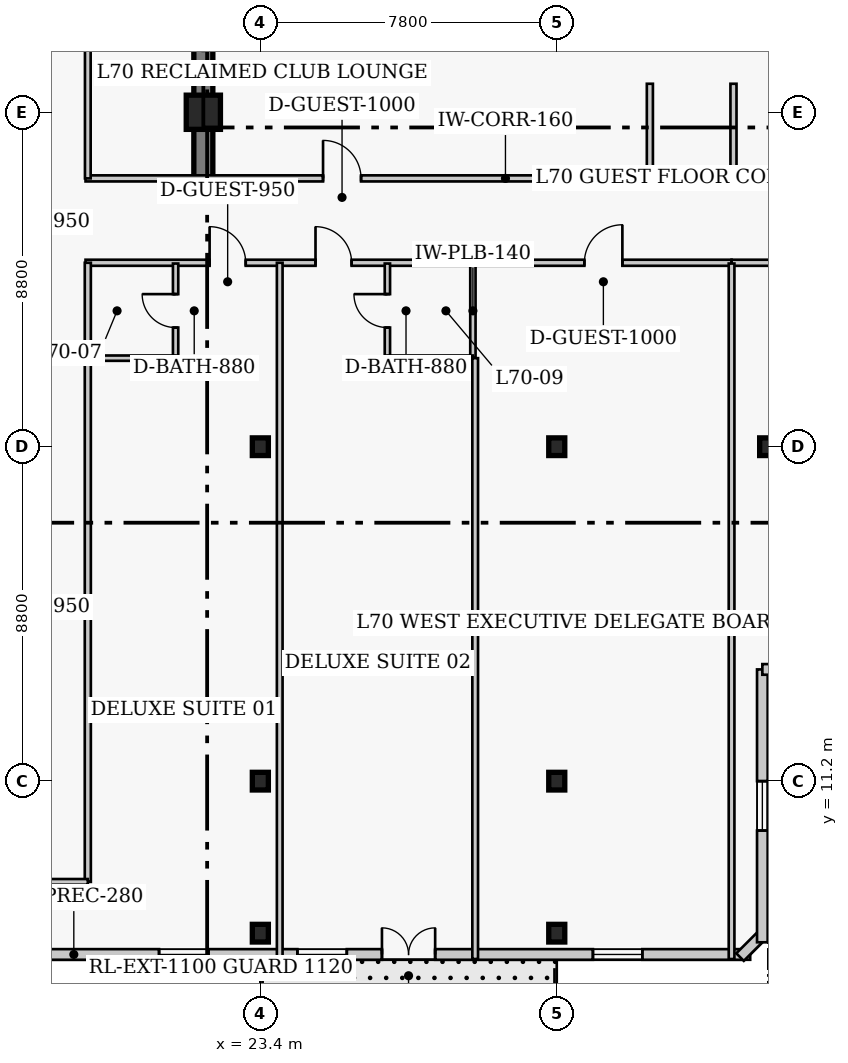
"""IFC4 building model, lengths in metres.
Left out: names, types, materials, properties, quantities, classifications, styles, units other than length and angle.
Written with IfcOpenShell. Run it as: python <this file> out.ifc"""

import sys

from ifc_helpers import new_model, si_unit, direction, frame, frame_2d, origin, origin_2d, place, context, subcontext, project, spatial, rectangle, i_section, extrude, element, fill, save


model = new_model("IFC4")
c1 = context("Model", 3, precision=1e-05, world=origin(), true_north=direction((0.0, 1.0)))
c2 = subcontext(c1, "Body", "Model", "MODEL_VIEW")
j1 = project(units=[si_unit("LENGTHUNIT", "METRE"), si_unit("PLANEANGLEUNIT", "RADIAN")], contexts=[c1])
p1 = place(None, origin())
s1 = spatial("IfcSite", under=j1, at=p1, CompositionType="ELEMENT")
p2 = place(p1, origin())
s2 = spatial("IfcBuilding", under=s1, at=p2, CompositionType="ELEMENT")
p3 = place(p2, frame((0.0, 0.0, 281.4)))
s3 = spatial("IfcBuildingStorey", under=s2, at=p3, CompositionType="ELEMENT", Elevation=281.4)
p4 = place(p3, frame((21.9, 27.05, 0.0), z_axis=(0.0, 0.0, 1.0), x_axis=(0.0, 1.0, 0.0)))
e1 = element("IfcWall", 1, at=p4, inside=s3, PredefinedType="SHEAR", context=c2, shape_type="SweptSolid", body=[
    extrude(rectangle(XDim=13.52, YDim=0.5, at=frame_2d((6.76, 0.0))), origin(), (0.0, 0.0, 1.0), 4.0),
])
for number, where, z_axis, x_axis in (
    (2, (23.4, 11.2, 0.0), (0.0, 0.0, 1.0), (1.0, 0.0, 0.0)),
    (3, (23.4, 20.0, 0.0), (0.0, 0.0, 1.0), (1.0, 0.0, 0.0)),
    (4, (31.2, 11.2, 0.0), (0.0, 0.0, 1.0), (1.0, 0.0, 0.0)),
    (5, (31.2, 20.0, 0.0), (0.0, 0.0, 1.0), (1.0, 0.0, 0.0)),
    (6, (36.75, 20.0, 0.0), (0.0, 0.0, 1.0), (1.0, 0.0, 0.0)),
):
    element("IfcColumn", number, at=place(p3, frame(where, z_axis=z_axis, x_axis=x_axis)), inside=s3, PredefinedType="COLUMN", context=c2, shape_type="SweptSolid", body=[
        extrude(i_section(OverallWidth=0.422, OverallDepth=0.465, WebThickness=0.045, FlangeThickness=0.073, FilletRadius=0.017, at=origin_2d()), origin(), (0.0, 0.0, 1.0), 4.0),
    ])
p5 = place(p3, frame((21.9, 28.8, 0.0), z_axis=(0.0, 0.0, 1.0), x_axis=(1.0, 0.0, 0.0)))
e7 = element("IfcColumn", 7, at=p5, inside=s3, PredefinedType="COLUMN", context=c2, shape_type="SweptSolid", body=[
    extrude(rectangle(XDim=0.9, YDim=0.9, at=origin_2d()), origin(), (0.0, 0.0, 1.0), 4.0),
])
for number, where, z_axis, x_axis in (
    (8, (23.4, 7.2, 0.0), (0.0, 0.0, 1.0), (1.0, 0.0, 0.0)),
    (9, (31.2, 7.2, 0.0), (0.0, 0.0, 1.0), (1.0, 0.0, 0.0)),
):
    element("IfcColumn", number, at=place(p3, frame(where, z_axis=z_axis, x_axis=x_axis)), inside=s3, PredefinedType="COLUMN", context=c2, shape_type="SweptSolid", body=[
        extrude(i_section(OverallWidth=0.422, OverallDepth=0.465, WebThickness=0.045, FlangeThickness=0.073, FilletRadius=0.017, at=origin_2d()), origin(), (0.0, 0.0, 1.0), 4.0),
    ])
p6 = place(p3, frame((11.46, 6.64, 0.0), z_axis=(0.0, 0.0, 1.0), x_axis=(1.0, 0.0, 0.0)))
e10 = element("IfcWall", 10, at=p6, inside=s3, PredefinedType="SOLIDWALL", context=c2, shape_type="SweptSolid", body=[
    extrude(rectangle(XDim=24.83, YDim=0.28, at=frame_2d((12.415, 0.0))), origin(), (0.0, 0.0, 1.0), 3.76),
])
p7 = place(p6, frame((15.14, 0.0, 0.0)))
e11 = element("IfcOpeningElement", 11, at=p7, cuts=e10, PredefinedType="OPENING", context=c2, shape_type="SweptSolid", body=[
    extrude(rectangle(XDim=1.4, YDim=2.15, at=frame_2d((0.7, 1.075))), frame((0.0, 0.15, 0.0), z_axis=(0.0, -1.0, 0.0), x_axis=(1.0, 0.0, 0.0)), (0.0, 0.0, 1.0), 0.3),
])
p8 = place(p6, frame((3.488, 0.0, 0.85)))
e12 = element("IfcOpeningElement", 12, at=p8, cuts=e10, PredefinedType="OPENING", context=c2, shape_type="SweptSolid", body=[
    extrude(rectangle(XDim=1.3, YDim=1.7, at=frame_2d((0.65, 0.85))), frame((0.0, 0.15, 0.0), z_axis=(0.0, -1.0, 0.0), x_axis=(1.0, 0.0, 0.0)), (0.0, 0.0, 1.0), 0.3),
])
p9 = place(p6, frame((12.915, 0.0, 0.85)))
e13 = element("IfcOpeningElement", 13, at=p9, cuts=e10, PredefinedType="OPENING", context=c2, shape_type="SweptSolid", body=[
    extrude(rectangle(XDim=1.3, YDim=1.7, at=frame_2d((0.65, 0.85))), frame((0.0, 0.15, 0.0), z_axis=(0.0, -1.0, 0.0), x_axis=(1.0, 0.0, 0.0)), (0.0, 0.0, 1.0), 0.3),
])
p10 = place(p6, frame((20.692, 0.0, 0.85)))
e14 = element("IfcOpeningElement", 14, at=p10, cuts=e10, PredefinedType="OPENING", context=c2, shape_type="SweptSolid", body=[
    extrude(rectangle(XDim=1.3, YDim=1.7, at=frame_2d((0.65, 0.85))), frame((0.0, 0.15, 0.0), z_axis=(0.0, -1.0, 0.0), x_axis=(1.0, 0.0, 0.0)), (0.0, 0.0, 1.0), 0.3),
])
p11 = place(p6, frame((9.275, 0.0, 0.85)))
e15 = element("IfcOpeningElement", 15, at=p11, cuts=e10, PredefinedType="OPENING", context=c2, shape_type="SweptSolid", body=[
    extrude(rectangle(XDim=1.3, YDim=1.7, at=frame_2d((0.65, 0.85))), frame((0.0, 0.15, 0.0), z_axis=(0.0, -1.0, 0.0), x_axis=(1.0, 0.0, 0.0)), (0.0, 0.0, 1.0), 0.3),
])
p12 = place(p3, frame((36.023, 6.571, 0.0), z_axis=(0.0, 0.0, 1.0), x_axis=(0.707106781187, 0.707106781187, 0.0)))
e16 = element("IfcWall", 16, at=p12, inside=s3, PredefinedType="SOLIDWALL", context=c2, shape_type="SweptSolid", body=[
    extrude(rectangle(XDim=0.928, YDim=0.28, at=frame_2d((0.464, 0.0))), origin(), (0.0, 0.0, 1.0), 3.76),
])
p13 = place(p3, frame((36.61, 6.96, 0.0), z_axis=(0.0, 0.0, 1.0), x_axis=(0.0, 1.0, 0.0)))
e17 = element("IfcWall", 17, at=p13, inside=s3, PredefinedType="SOLIDWALL", context=c2, shape_type="SweptSolid", body=[
    extrude(rectangle(XDim=7.18, YDim=0.28, at=frame_2d((3.59, 0.0))), origin(), (0.0, 0.0, 1.0), 3.76),
])
p14 = place(p13, frame((2.94, 0.0, 0.85)))
e18 = element("IfcOpeningElement", 18, at=p14, cuts=e17, PredefinedType="OPENING", context=c2, shape_type="SweptSolid", body=[
    extrude(rectangle(XDim=1.3, YDim=1.7, at=frame_2d((0.65, 0.85))), frame((0.0, 0.15, 0.0), z_axis=(0.0, -1.0, 0.0), x_axis=(1.0, 0.0, 0.0)), (0.0, 0.0, 1.0), 0.3),
])
p15 = place(p3, frame((36.61, 14.14, 0.0), z_axis=(0.0, 0.0, 1.0), x_axis=(1.0, 0.0, 0.0)))
e19 = element("IfcWall", 19, at=p15, inside=s3, PredefinedType="SOLIDWALL", context=c2, shape_type="SweptSolid", body=[
    extrude(rectangle(XDim=4.78, YDim=0.28, at=frame_2d((2.39, 0.0))), origin(), (0.0, 0.0, 1.0), 3.76),
])
p16 = place(p15, frame((1.74, 0.0, 0.85)))
e20 = element("IfcOpeningElement", 20, at=p16, cuts=e19, PredefinedType="OPENING", context=c2, shape_type="SweptSolid", body=[
    extrude(rectangle(XDim=1.3, YDim=1.7, at=frame_2d((0.65, 0.85))), frame((0.0, 0.15, 0.0), z_axis=(0.0, -1.0, 0.0), x_axis=(1.0, 0.0, 0.0)), (0.0, 0.0, 1.0), 0.3),
])
p17 = place(p3, frame((18.8, 27.06, 0.0), z_axis=(0.0, 0.0, 1.0), x_axis=(1.0, 0.0, 0.0)))
e21 = element("IfcWall", 21, at=p17, inside=s3, PredefinedType="PARTITIONING", context=c2, shape_type="SweptSolid", body=[
    extrude(rectangle(XDim=14.85, YDim=0.16, at=frame_2d((7.425, 0.0))), origin(), (0.0, 0.0, 1.0), 3.76),
])
p18 = place(p17, frame((6.25, 0.0, 0.0)))
e22 = element("IfcOpeningElement", 22, at=p18, cuts=e21, PredefinedType="OPENING", context=c2, shape_type="SweptSolid", body=[
    extrude(rectangle(XDim=1.0, YDim=2.15, at=frame_2d((0.5, 1.075))), frame((0.0, 0.09, 0.0), z_axis=(0.0, -1.0, 0.0), x_axis=(1.0, 0.0, 0.0)), (0.0, 0.0, 1.0), 0.18),
])
p19 = place(p3, frame((35.85, 27.06, 0.0), z_axis=(0.0, 0.0, 1.0), x_axis=(1.0, 0.0, 0.0)))
e23 = element("IfcWall", 23, at=p19, inside=s3, PredefinedType="PARTITIONING", context=c2, shape_type="SweptSolid", body=[
    extrude(rectangle(XDim=23.35, YDim=0.16, at=frame_2d((11.675, 0.0))), origin(), (0.0, 0.0, 1.0), 3.76),
])
p20 = place(p19, frame((6.15, 0.0, 0.0)))
e24 = element("IfcOpeningElement", 24, at=p20, cuts=e23, PredefinedType="OPENING", context=c2, shape_type="SweptSolid", body=[
    extrude(rectangle(XDim=1.0, YDim=2.15, at=frame_2d((0.5, 1.075))), frame((0.0, 0.09, 0.0), z_axis=(0.0, -1.0, 0.0), x_axis=(1.0, 0.0, 0.0)), (0.0, 0.0, 1.0), 0.18),
])
p21 = place(p19, frame((13.65, 0.0, 0.0)))
e25 = element("IfcOpeningElement", 25, at=p21, cuts=e23, PredefinedType="OPENING", context=c2, shape_type="SweptSolid", body=[
    extrude(rectangle(XDim=1.0, YDim=2.15, at=frame_2d((0.5, 1.075))), frame((0.0, 0.09, 0.0), z_axis=(0.0, -1.0, 0.0), x_axis=(1.0, 0.0, 0.0)), (0.0, 0.0, 1.0), 0.18),
])
for number, where, z_axis, x_axis in (
    (26, (33.65, 27.06, 0.0), (0.0, 0.0, 1.0), (0.0, 1.0, 0.0)),
    (27, (35.85, 27.06, 0.0), (0.0, 0.0, 1.0), (0.0, 1.0, 0.0)),
):
    element("IfcWall", number, at=place(p3, frame(where, z_axis=z_axis, x_axis=x_axis)), inside=s3, PredefinedType="PARTITIONING", context=c2, shape_type="SweptSolid", body=[
        extrude(rectangle(XDim=2.49, YDim=0.16, at=frame_2d((1.245, 0.0))), origin(), (0.0, 0.0, 1.0), 3.76),
    ])
p22 = place(p3, frame((18.8, 24.84, 0.0), z_axis=(0.0, 0.0, 1.0), x_axis=(1.0, 0.0, 0.0)))
e28 = element("IfcWall", 28, at=p22, inside=s3, PredefinedType="PARTITIONING", context=c2, shape_type="SweptSolid", body=[
    extrude(rectangle(XDim=17.0, YDim=0.16, at=frame_2d((8.5, 0.0))), origin(), (0.0, 0.0, 1.0), 3.76),
])
p23 = place(p22, frame((3.265, 0.0, 0.0)))
e29 = element("IfcOpeningElement", 29, at=p23, cuts=e28, PredefinedType="OPENING", context=c2, shape_type="SweptSolid", body=[
    extrude(rectangle(XDim=0.95, YDim=2.1, at=frame_2d((0.475, 1.05))), frame((0.0, 0.09, 0.0), z_axis=(0.0, -1.0, 0.0), x_axis=(1.0, 0.0, 0.0)), (0.0, 0.0, 1.0), 0.18),
])
p24 = place(p22, frame((6.052, 0.0, 0.0)))
e30 = element("IfcOpeningElement", 30, at=p24, cuts=e28, PredefinedType="OPENING", context=c2, shape_type="SweptSolid", body=[
    extrude(rectangle(XDim=0.95, YDim=2.1, at=frame_2d((0.475, 1.05))), frame((0.0, 0.09, 0.0), z_axis=(0.0, -1.0, 0.0), x_axis=(1.0, 0.0, 0.0)), (0.0, 0.0, 1.0), 0.18),
])
p25 = place(p22, frame((13.127, 0.0, 0.0)))
e31 = element("IfcOpeningElement", 31, at=p25, cuts=e28, PredefinedType="OPENING", context=c2, shape_type="SweptSolid", body=[
    extrude(rectangle(XDim=1.0, YDim=2.15, at=frame_2d((0.5, 1.075))), frame((0.0, 0.09, 0.0), z_axis=(0.0, -1.0, 0.0), x_axis=(1.0, 0.0, 0.0)), (0.0, 0.0, 1.0), 0.18),
])
p26 = place(p3, frame((35.8, 24.84, 0.0), z_axis=(0.0, 0.0, 1.0), x_axis=(1.0, 0.0, 0.0)))
e32 = element("IfcWall", 32, at=p26, inside=s3, PredefinedType="PARTITIONING", context=c2, shape_type="SweptSolid", body=[
    extrude(rectangle(XDim=25.56, YDim=0.16, at=frame_2d((12.78, 0.0))), origin(), (0.0, 0.0, 1.0), 3.76),
])
p27 = place(p26, frame((4.185, 0.0, 0.0)))
e33 = element("IfcOpeningElement", 33, at=p27, cuts=e32, PredefinedType="OPENING", context=c2, shape_type="SweptSolid", body=[
    extrude(rectangle(XDim=0.95, YDim=2.1, at=frame_2d((0.475, 1.05))), frame((0.0, 0.09, 0.0), z_axis=(0.0, -1.0, 0.0), x_axis=(1.0, 0.0, 0.0)), (0.0, 0.0, 1.0), 0.18),
])
p28 = place(p26, frame((17.28, 0.0, 0.0)))
e34 = element("IfcOpeningElement", 34, at=p28, cuts=e32, PredefinedType="OPENING", context=c2, shape_type="SweptSolid", body=[
    extrude(rectangle(XDim=1.0, YDim=2.15, at=frame_2d((0.5, 1.075))), frame((0.0, 0.09, 0.0), z_axis=(0.0, -1.0, 0.0), x_axis=(1.0, 0.0, 0.0)), (0.0, 0.0, 1.0), 0.18),
])
p29 = place(p26, frame((24.015, 0.0, 0.0)))
e35 = element("IfcOpeningElement", 35, at=p29, cuts=e32, PredefinedType="OPENING", context=c2, shape_type="SweptSolid", body=[
    extrude(rectangle(XDim=0.95, YDim=2.1, at=frame_2d((0.475, 1.05))), frame((0.0, 0.09, 0.0), z_axis=(0.0, -1.0, 0.0), x_axis=(1.0, 0.0, 0.0)), (0.0, 0.0, 1.0), 0.18),
])
p30 = place(p3, frame((18.86, 8.55, 0.0), z_axis=(0.0, 0.0, 1.0), x_axis=(0.0, 1.0, 0.0)))
e36 = element("IfcWall", 36, at=p30, inside=s3, PredefinedType="PARTITIONING", context=c2, shape_type="SweptSolid", body=[
    extrude(rectangle(XDim=16.29, YDim=0.16, at=frame_2d((8.145, 0.0))), origin(), (0.0, 0.0, 1.0), 3.76),
])
p31 = place(p3, frame((16.64, 8.55, 0.0), z_axis=(0.0, 0.0, 1.0), x_axis=(1.0, 0.0, 0.0)))
e37 = element("IfcWall", 37, at=p31, inside=s3, PredefinedType="PARTITIONING", context=c2, shape_type="SweptSolid", body=[
    extrude(rectangle(XDim=2.22, YDim=0.15, at=frame_2d((1.11, 0.0))), origin(), (0.0, 0.0, 1.0), 3.76),
])
p32 = place(p3, frame((18.86, 27.06, 0.0), z_axis=(0.0, 0.0, 1.0), x_axis=(0.0, 1.0, 0.0)))
e38 = element("IfcWall", 38, at=p32, inside=s3, PredefinedType="PARTITIONING", context=c2, shape_type="SweptSolid", body=[
    extrude(rectangle(XDim=5.74, YDim=0.15, at=frame_2d((2.87, 0.0))), origin(), (0.0, 0.0, 1.0), 3.76),
])
p33 = place(p3, frame((21.17, 22.33, 0.0), z_axis=(0.0, 0.0, 1.0), x_axis=(0.0, 1.0, 0.0)))
e39 = element("IfcWall", 39, at=p33, inside=s3, PredefinedType="PLUMBINGWALL", context=c2, shape_type="SweptSolid", body=[
    extrude(rectangle(XDim=2.49, YDim=0.14, at=frame_2d((1.245, 0.0))), origin(), (0.0, 0.0, 1.0), 3.76),
])
p34 = place(p33, frame((0.805, 0.0, 0.0)))
e40 = element("IfcOpeningElement", 40, at=p34, cuts=e39, PredefinedType="OPENING", context=c2, shape_type="SweptSolid", body=[
    extrude(rectangle(XDim=0.88, YDim=2.05, at=frame_2d((0.44, 1.025))), frame((0.0, 0.08, 0.0), z_axis=(0.0, -1.0, 0.0), x_axis=(1.0, 0.0, 0.0)), (0.0, 0.0, 1.0), 0.16),
])
p35 = place(p3, frame((18.92, 22.33, 0.0), z_axis=(0.0, 0.0, 1.0), x_axis=(1.0, 0.0, 0.0)))
e41 = element("IfcWall", 41, at=p35, inside=s3, PredefinedType="PLUMBINGWALL", context=c2, shape_type="SweptSolid", body=[
    extrude(rectangle(XDim=2.25, YDim=0.14, at=frame_2d((1.125, 0.0))), origin(), (0.0, 0.0, 1.0), 3.76),
])
p36 = place(p3, frame((23.91, 6.52, 0.0), z_axis=(0.0, 0.0, 1.0), x_axis=(0.0, 1.0, 0.0)))
e42 = element("IfcWall", 42, at=p36, inside=s3, PredefinedType="PARTITIONING", context=c2, shape_type="SweptSolid", body=[
    extrude(rectangle(XDim=18.32, YDim=0.15, at=frame_2d((9.16, 0.0))), origin(), (0.0, 0.0, 1.0), 3.76),
])
p37 = place(p3, frame((26.743, 22.33, 0.0), z_axis=(0.0, 0.0, 1.0), x_axis=(0.0, 1.0, 0.0)))
e43 = element("IfcWall", 43, at=p37, inside=s3, PredefinedType="PLUMBINGWALL", context=c2, shape_type="SweptSolid", body=[
    extrude(rectangle(XDim=2.49, YDim=0.14, at=frame_2d((1.245, 0.0))), origin(), (0.0, 0.0, 1.0), 3.76),
])
p38 = place(p37, frame((0.805, 0.0, 0.0)))
e44 = element("IfcOpeningElement", 44, at=p38, cuts=e43, PredefinedType="OPENING", context=c2, shape_type="SweptSolid", body=[
    extrude(rectangle(XDim=0.88, YDim=2.05, at=frame_2d((0.44, 1.025))), frame((0.0, 0.08, 0.0), z_axis=(0.0, -1.0, 0.0), x_axis=(1.0, 0.0, 0.0)), (0.0, 0.0, 1.0), 0.16),
])
p39 = place(p3, frame((28.993, 22.33, 0.0), z_axis=(0.0, 0.0, 1.0), x_axis=(0.0, 1.0, 0.0)))
e45 = element("IfcWall", 45, at=p39, inside=s3, PredefinedType="PLUMBINGWALL", context=c2, shape_type="SweptSolid", body=[
    extrude(rectangle(XDim=2.49, YDim=0.14, at=frame_2d((1.245, 0.0))), origin(), (0.0, 0.0, 1.0), 3.76),
])
p40 = place(p3, frame((26.743, 22.33, 0.0), z_axis=(0.0, 0.0, 1.0), x_axis=(1.0, 0.0, 0.0)))
e46 = element("IfcWall", 46, at=p40, inside=s3, PredefinedType="PLUMBINGWALL", context=c2, shape_type="SweptSolid", body=[
    extrude(rectangle(XDim=2.25, YDim=0.14, at=frame_2d((1.125, 0.0))), origin(), (0.0, 0.0, 1.0), 3.76),
])
p41 = place(p3, frame((29.053, 6.52, 0.0), z_axis=(0.0, 0.0, 1.0), x_axis=(0.0, 1.0, 0.0)))
e47 = element("IfcWall", 47, at=p41, inside=s3, PredefinedType="PARTITIONING", context=c2, shape_type="SweptSolid", body=[
    extrude(rectangle(XDim=15.81, YDim=0.15, at=frame_2d((7.905, 0.0))), origin(), (0.0, 0.0, 1.0), 3.76),
])
p42 = place(p3, frame((35.8, 6.52, 0.0), z_axis=(0.0, 0.0, 1.0), x_axis=(0.0, 1.0, 0.0)))
e48 = element("IfcWall", 48, at=p42, inside=s3, PredefinedType="PARTITIONING", context=c2, shape_type="SweptSolid", body=[
    extrude(rectangle(XDim=18.3, YDim=0.15, at=frame_2d((9.15, 0.0))), origin(), (0.0, 0.0, 1.0), 3.76),
])
p43 = place(p7, origin())
e49 = element("IfcDoor", 49, at=p43, inside=s3, OperationType="DOUBLE_DOOR_SINGLE_SWING", PredefinedType="DOOR", context=c2, shape_type="SweptSolid", body=[
    extrude(rectangle(XDim=1.4, YDim=2.15, at=frame_2d((0.7, 1.075))), frame((0.0, 0.025, 0.0), z_axis=(0.0, -1.0, 0.0), x_axis=(1.0, 0.0, 0.0)), (0.0, 0.0, 1.0), 0.05),
])
fill(e11, e49)
p44 = place(p9, origin())
e50 = element("IfcWindow", 50, at=p44, inside=s3, PartitioningType="SINGLE_PANEL", PredefinedType="WINDOW", context=c2, shape_type="SweptSolid", body=[
    extrude(rectangle(XDim=1.3, YDim=1.7, at=frame_2d((0.65, 0.85))), frame((0.0, 0.03, 0.0), z_axis=(0.0, -1.0, 0.0), x_axis=(1.0, 0.0, 0.0)), (0.0, 0.0, 1.0), 0.06),
])
fill(e13, e50)
p45 = place(p10, origin())
e51 = element("IfcWindow", 51, at=p45, inside=s3, PartitioningType="SINGLE_PANEL", PredefinedType="WINDOW", context=c2, shape_type="SweptSolid", body=[
    extrude(rectangle(XDim=1.3, YDim=1.7, at=frame_2d((0.65, 0.85))), frame((0.0, 0.03, 0.0), z_axis=(0.0, -1.0, 0.0), x_axis=(1.0, 0.0, 0.0)), (0.0, 0.0, 1.0), 0.06),
])
fill(e14, e51)
p46 = place(p14, origin())
e52 = element("IfcWindow", 52, at=p46, inside=s3, PartitioningType="SINGLE_PANEL", PredefinedType="WINDOW", context=c2, shape_type="SweptSolid", body=[
    extrude(rectangle(XDim=1.3, YDim=1.7, at=frame_2d((0.65, 0.85))), frame((0.0, 0.03, 0.0), z_axis=(0.0, -1.0, 0.0), x_axis=(1.0, 0.0, 0.0)), (0.0, 0.0, 1.0), 0.06),
])
fill(e18, e52)
p47 = place(p11, origin())
e53 = element("IfcWindow", 53, at=p47, inside=s3, PartitioningType="SINGLE_PANEL", PredefinedType="WINDOW", context=c2, shape_type="SweptSolid", body=[
    extrude(rectangle(XDim=1.3, YDim=1.7, at=frame_2d((0.65, 0.85))), frame((0.0, 0.03, 0.0), z_axis=(0.0, -1.0, 0.0), x_axis=(1.0, 0.0, 0.0)), (0.0, 0.0, 1.0), 0.06),
])
fill(e15, e53)
p48 = place(p18, origin())
e54 = element("IfcDoor", 54, at=p48, inside=s3, OperationType="SINGLE_SWING_LEFT", PredefinedType="DOOR", context=c2, shape_type="SweptSolid", body=[
    extrude(rectangle(XDim=1.0, YDim=2.15, at=frame_2d((0.5, 1.075))), frame((0.0, 0.025, 0.0), z_axis=(0.0, -1.0, 0.0), x_axis=(1.0, 0.0, 0.0)), (0.0, 0.0, 1.0), 0.05),
])
fill(e22, e54)
p49 = place(p34, origin())
e55 = element("IfcDoor", 55, at=p49, inside=s3, OperationType="SINGLE_SWING_RIGHT", PredefinedType="DOOR", context=c2, shape_type="SweptSolid", body=[
    extrude(rectangle(XDim=0.88, YDim=2.05, at=frame_2d((0.44, 1.025))), frame((0.0, 0.025, 0.0), z_axis=(0.0, -1.0, 0.0), x_axis=(1.0, 0.0, 0.0)), (0.0, 0.0, 1.0), 0.05),
])
fill(e40, e55)
p50 = place(p23, origin())
e56 = element("IfcDoor", 56, at=p50, inside=s3, OperationType="SINGLE_SWING_LEFT", PredefinedType="DOOR", context=c2, shape_type="SweptSolid", body=[
    extrude(rectangle(XDim=0.95, YDim=2.1, at=frame_2d((0.475, 1.05))), frame((0.0, 0.025, 0.0), z_axis=(0.0, -1.0, 0.0), x_axis=(1.0, 0.0, 0.0)), (0.0, 0.0, 1.0), 0.05),
])
fill(e29, e56)
p51 = place(p38, origin())
e57 = element("IfcDoor", 57, at=p51, inside=s3, OperationType="SINGLE_SWING_RIGHT", PredefinedType="DOOR", context=c2, shape_type="SweptSolid", body=[
    extrude(rectangle(XDim=0.88, YDim=2.05, at=frame_2d((0.44, 1.025))), frame((0.0, 0.025, 0.0), z_axis=(0.0, -1.0, 0.0), x_axis=(1.0, 0.0, 0.0)), (0.0, 0.0, 1.0), 0.05),
])
fill(e44, e57)
p52 = place(p24, origin())
e58 = element("IfcDoor", 58, at=p52, inside=s3, OperationType="SINGLE_SWING_LEFT", PredefinedType="DOOR", context=c2, shape_type="SweptSolid", body=[
    extrude(rectangle(XDim=0.95, YDim=2.1, at=frame_2d((0.475, 1.05))), frame((0.0, 0.025, 0.0), z_axis=(0.0, -1.0, 0.0), x_axis=(1.0, 0.0, 0.0)), (0.0, 0.0, 1.0), 0.05),
])
fill(e30, e58)
p53 = place(p25, origin())
e59 = element("IfcDoor", 59, at=p53, inside=s3, OperationType="SINGLE_SWING_RIGHT", PredefinedType="DOOR", context=c2, shape_type="SweptSolid", body=[
    extrude(rectangle(XDim=1.0, YDim=2.15, at=frame_2d((0.5, 1.075))), frame((0.0, 0.025, 0.0), z_axis=(0.0, -1.0, 0.0), x_axis=(1.0, 0.0, 0.0)), (0.0, 0.0, 1.0), 0.05),
])
fill(e31, e59)
save(model, sys.argv[1])
